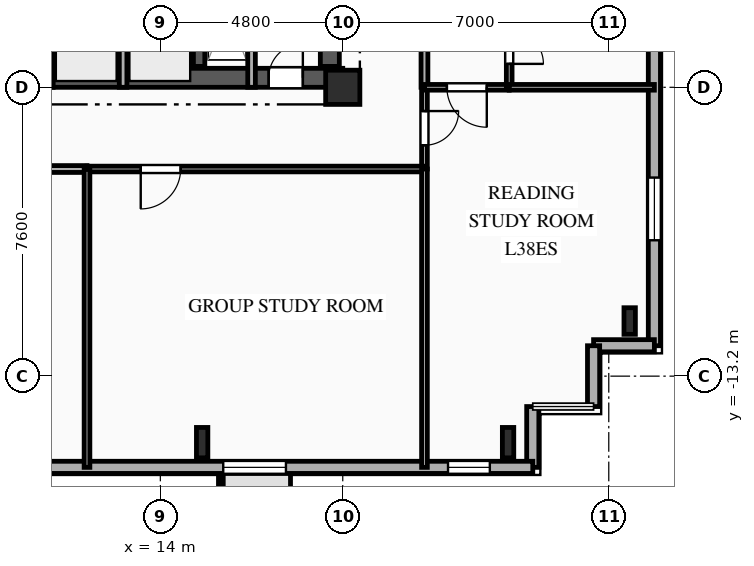
"""IFC4 building model, lengths in metres.
Left out: names, types, materials, properties, quantities, classifications, styles, units other than length and angle.
Written with IfcOpenShell. Run it as: python <this file> out.ifc"""

import sys

from ifc_helpers import new_model, si_unit, direction, frame, frame_2d, origin, origin_2d, place, context, subcontext, project, spatial, rectangle, i_section, extrude, element, fill, save


model = new_model("IFC4")
c1 = context("Model", 3, precision=1e-05, world=origin(), true_north=direction((0.0, 1.0)))
c2 = subcontext(c1, "Body", "Model", "MODEL_VIEW")
j1 = project(units=[si_unit("LENGTHUNIT", "METRE"), si_unit("PLANEANGLEUNIT", "RADIAN")], contexts=[c1])
p1 = place(None, origin())
s1 = spatial("IfcSite", under=j1, at=p1, CompositionType="ELEMENT")
p2 = place(p1, origin())
s2 = spatial("IfcBuilding", under=s1, at=p2, CompositionType="ELEMENT")
p3 = place(p2, frame((0.0, 0.0, 137.7)))
s3 = spatial("IfcBuildingStorey", under=s2, at=p3, CompositionType="ELEMENT", Elevation=137.7)
p4 = place(p3, frame((18.8, -5.6, 0.0), z_axis=(0.0, 0.0, 1.0), x_axis=(1.0, 0.0, 0.0)))
e1 = element("IfcColumn", 1, at=p4, inside=s3, PredefinedType="COLUMN", context=c2, shape_type="SweptSolid", body=[
    extrude(rectangle(XDim=0.9, YDim=0.9, at=origin_2d()), origin(), (0.0, 0.0, 1.0), 3.35),
])
for number, where, z_axis, x_axis in (
    (2, (15.1, -14.95, 0.0), (0.0, 0.0, 1.0), (1.0, 0.0, 0.0)),
    (3, (23.15, -14.95, 0.0), (0.0, 0.0, 1.0), (1.0, 0.0, 0.0)),
):
    element("IfcColumn", number, at=place(p3, frame(where, z_axis=z_axis, x_axis=x_axis)), inside=s3, PredefinedType="COLUMN", context=c2, shape_type="SweptSolid", body=[
        extrude(i_section(OverallWidth=0.3, OverallDepth=0.8, WebThickness=0.018, FlangeThickness=0.033, FilletRadius=0.03, at=origin_2d()), origin(), (0.0, 0.0, 1.0), 3.35),
    ])
p5 = place(p3, frame((26.35, -11.75, 0.0), z_axis=(0.0, 0.0, 1.0), x_axis=(1.0, 0.0, 0.0)))
e4 = element("IfcColumn", 4, at=p5, inside=s3, PredefinedType="COLUMN", context=c2, shape_type="SweptSolid", body=[
    extrude(i_section(OverallWidth=0.3, OverallDepth=0.7, WebThickness=0.017, FlangeThickness=0.032, FilletRadius=0.027, at=origin_2d()), origin(), (0.0, 0.0, 1.0), 3.35),
])
p6 = place(p3, frame((27.0, 17.2, 0.0), z_axis=(0.0, 0.0, 1.0), x_axis=(0.0, -1.0, 0.0)))
e5 = element("IfcWall", 5, at=p6, inside=s3, PredefinedType="SOLIDWALL", context=c2, shape_type="SweptSolid", body=[
    extrude(rectangle(XDim=29.6, YDim=0.32, at=frame_2d((14.8, 0.0))), origin(), (0.0, 0.0, 1.0), 3.04),
])
p7 = place(p6, frame((3.775, 0.0, 0.85)))
e6 = element("IfcOpeningElement", 6, at=p7, cuts=e5, PredefinedType="OPENING", context=c2, shape_type="SweptSolid", body=[
    extrude(rectangle(XDim=1.65, YDim=1.85, at=frame_2d((0.825, 0.925))), frame((0.0, 0.17, 0.0), z_axis=(0.0, -1.0, 0.0), x_axis=(1.0, 0.0, 0.0)), (0.0, 0.0, 1.0), 0.34),
])
p8 = place(p6, frame((9.37, 0.0, 0.85)))
e7 = element("IfcOpeningElement", 7, at=p8, cuts=e5, PredefinedType="OPENING", context=c2, shape_type="SweptSolid", body=[
    extrude(rectangle(XDim=1.5, YDim=1.85, at=frame_2d((0.75, 0.925))), frame((0.0, 0.17, 0.0), z_axis=(0.0, -1.0, 0.0), x_axis=(1.0, 0.0, 0.0)), (0.0, 0.0, 1.0), 0.34),
])
p9 = place(p6, frame((12.25, 0.0, 0.85)))
e8 = element("IfcOpeningElement", 8, at=p9, cuts=e5, PredefinedType="OPENING", context=c2, shape_type="SweptSolid", body=[
    extrude(rectangle(XDim=1.5, YDim=1.85, at=frame_2d((0.75, 0.925))), frame((0.0, 0.17, 0.0), z_axis=(0.0, -1.0, 0.0), x_axis=(1.0, 0.0, 0.0)), (0.0, 0.0, 1.0), 0.34),
])
p10 = place(p6, frame((15.05, 0.0, 0.85)))
e9 = element("IfcOpeningElement", 9, at=p10, cuts=e5, PredefinedType="OPENING", context=c2, shape_type="SweptSolid", body=[
    extrude(rectangle(XDim=1.5, YDim=1.85, at=frame_2d((0.75, 0.925))), frame((0.0, 0.17, 0.0), z_axis=(0.0, -1.0, 0.0), x_axis=(1.0, 0.0, 0.0)), (0.0, 0.0, 1.0), 0.34),
])
p11 = place(p6, frame((17.865, 0.0, 0.85)))
e10 = element("IfcOpeningElement", 10, at=p11, cuts=e5, PredefinedType="OPENING", context=c2, shape_type="SweptSolid", body=[
    extrude(rectangle(XDim=1.95, YDim=1.85, at=frame_2d((0.975, 0.925))), frame((0.0, 0.17, 0.0), z_axis=(0.0, -1.0, 0.0), x_axis=(1.0, 0.0, 0.0)), (0.0, 0.0, 1.0), 0.34),
])
p12 = place(p6, frame((25.175, 0.0, 0.85)))
e11 = element("IfcOpeningElement", 11, at=p12, cuts=e5, PredefinedType="OPENING", context=c2, shape_type="SweptSolid", body=[
    extrude(rectangle(XDim=1.65, YDim=1.85, at=frame_2d((0.825, 0.925))), frame((0.0, 0.17, 0.0), z_axis=(0.0, -1.0, 0.0), x_axis=(1.0, 0.0, 0.0)), (0.0, 0.0, 1.0), 0.34),
])
for number, where, z_axis, x_axis in (
    (12, (27.0, -12.4, 0.0), (0.0, 0.0, 1.0), (-1.0, 0.0, 0.0)),
    (13, (25.4, -12.4, 0.0), (0.0, 0.0, 1.0), (0.0, -1.0, 0.0)),
    (14, (23.8, -14.0, 0.0), (0.0, 0.0, 1.0), (0.0, -1.0, 0.0)),
):
    element("IfcWall", number, at=place(p3, frame(where, z_axis=z_axis, x_axis=x_axis)), inside=s3, PredefinedType="SOLIDWALL", context=c2, shape_type="SweptSolid", body=[
        extrude(rectangle(XDim=1.6, YDim=0.32, at=frame_2d((0.8, 0.0))), origin(), (0.0, 0.0, 1.0), 3.04),
    ])
p13 = place(p3, frame((23.8, -15.6, 0.0), z_axis=(0.0, 0.0, 1.0), x_axis=(-1.0, 0.0, 0.0)))
e15 = element("IfcWall", 15, at=p13, inside=s3, PredefinedType="SOLIDWALL", context=c2, shape_type="SweptSolid", body=[
    extrude(rectangle(XDim=49.6, YDim=0.32, at=frame_2d((24.8, 0.0))), origin(), (0.0, 0.0, 1.0), 3.04),
])
p14 = place(p13, frame((1.13, 0.0, 0.85)))
e16 = element("IfcOpeningElement", 16, at=p14, cuts=e15, PredefinedType="OPENING", context=c2, shape_type="SweptSolid", body=[
    extrude(rectangle(XDim=1.1, YDim=1.85, at=frame_2d((0.55, 0.925))), frame((0.0, 0.17, 0.0), z_axis=(0.0, -1.0, 0.0), x_axis=(1.0, 0.0, 0.0)), (0.0, 0.0, 1.0), 0.34),
])
p15 = place(p13, frame((6.495, 0.0, 0.85)))
e17 = element("IfcOpeningElement", 17, at=p15, cuts=e15, PredefinedType="OPENING", context=c2, shape_type="SweptSolid", body=[
    extrude(rectangle(XDim=1.65, YDim=1.85, at=frame_2d((0.825, 0.925))), frame((0.0, 0.17, 0.0), z_axis=(0.0, -1.0, 0.0), x_axis=(1.0, 0.0, 0.0)), (0.0, 0.0, 1.0), 0.34),
])
p16 = place(p13, frame((13.996, 0.0, 0.85)))
e18 = element("IfcOpeningElement", 18, at=p16, cuts=e15, PredefinedType="OPENING", context=c2, shape_type="SweptSolid", body=[
    extrude(rectangle(XDim=2.2, YDim=1.85, at=frame_2d((1.1, 0.925))), frame((0.0, 0.17, 0.0), z_axis=(0.0, -1.0, 0.0), x_axis=(1.0, 0.0, 0.0)), (0.0, 0.0, 1.0), 0.34),
])
p17 = place(p13, frame((22.396, 0.0, 0.85)))
e19 = element("IfcOpeningElement", 19, at=p17, cuts=e15, PredefinedType="OPENING", context=c2, shape_type="SweptSolid", body=[
    extrude(rectangle(XDim=2.2, YDim=1.85, at=frame_2d((1.1, 0.925))), frame((0.0, 0.17, 0.0), z_axis=(0.0, -1.0, 0.0), x_axis=(1.0, 0.0, 0.0)), (0.0, 0.0, 1.0), 0.34),
])
p18 = place(p13, frame((30.2, 0.0, 0.85)))
e20 = element("IfcOpeningElement", 20, at=p18, cuts=e15, PredefinedType="OPENING", context=c2, shape_type="SweptSolid", body=[
    extrude(rectangle(XDim=2.2, YDim=1.85, at=frame_2d((1.1, 0.925))), frame((0.0, 0.17, 0.0), z_axis=(0.0, -1.0, 0.0), x_axis=(1.0, 0.0, 0.0)), (0.0, 0.0, 1.0), 0.34),
])
p19 = place(p13, frame((38.673, 0.0, 0.85)))
e21 = element("IfcOpeningElement", 21, at=p19, cuts=e15, PredefinedType="OPENING", context=c2, shape_type="SweptSolid", body=[
    extrude(rectangle(XDim=1.65, YDim=1.85, at=frame_2d((0.825, 0.925))), frame((0.0, 0.17, 0.0), z_axis=(0.0, -1.0, 0.0), x_axis=(1.0, 0.0, 0.0)), (0.0, 0.0, 1.0), 0.34),
])
p20 = place(p13, frame((46.175, 0.0, 0.85)))
e22 = element("IfcOpeningElement", 22, at=p20, cuts=e15, PredefinedType="OPENING", context=c2, shape_type="SweptSolid", body=[
    extrude(rectangle(XDim=1.65, YDim=1.85, at=frame_2d((0.825, 0.925))), frame((0.0, 0.17, 0.0), z_axis=(0.0, -1.0, 0.0), x_axis=(1.0, 0.0, 0.0)), (0.0, 0.0, 1.0), 0.34),
])
p21 = place(p3, frame((9.2, -5.35, 0.0), z_axis=(0.0, 0.0, 1.0), x_axis=(1.0, 0.0, 0.0)))
e23 = element("IfcWall", 23, at=p21, inside=s3, PredefinedType="SHEAR", context=c2, shape_type="SweptSolid", body=[
    extrude(rectangle(XDim=9.6, YDim=0.5, at=frame_2d((4.8, 0.0))), origin(), (0.0, 0.0, 1.0), 3.04),
])
p22 = place(p21, frame((7.65, 0.0, 0.0)))
e24 = element("IfcOpeningElement", 24, at=p22, cuts=e23, PredefinedType="OPENING", context=c2, shape_type="SweptSolid", body=[
    extrude(rectangle(XDim=0.9, YDim=2.1, at=frame_2d((0.45, 1.05))), frame((0.0, 0.26, 0.0), z_axis=(0.0, -1.0, 0.0), x_axis=(1.0, 0.0, 0.0)), (0.0, 0.0, 1.0), 0.52),
])
p23 = place(p3, frame((18.46, -5.05, 0.0), z_axis=(0.0, 0.0, 1.0), x_axis=(0.0, 1.0, 0.0)))
e25 = element("IfcWall", 25, at=p23, inside=s3, PredefinedType="SHEAR", context=c2, shape_type="SweptSolid", body=[
    extrude(rectangle(XDim=10.1, YDim=0.5, at=frame_2d((5.05, 0.0))), origin(), (0.0, 0.0, 1.0), 3.04),
])
p24 = place(p3, frame((15.02, -5.05, 0.0), z_axis=(0.0, 0.0, 1.0), x_axis=(0.0, 1.0, 0.0)))
e26 = element("IfcWall", 26, at=p24, inside=s3, PredefinedType="SHEAR", context=c2, shape_type="SweptSolid", body=[
    extrude(rectangle(XDim=10.1, YDim=0.3, at=frame_2d((5.05, 0.0))), origin(), (0.0, 0.0, 1.0), 3.04),
])
p25 = place(p3, frame((16.4, -2.11, 0.0), z_axis=(0.0, 0.0, 1.0), x_axis=(0.0, -1.0, 0.0)))
e27 = element("IfcWall", 27, at=p25, inside=s3, PredefinedType="PARTITIONING", context=c2, shape_type="SweptSolid", body=[
    extrude(rectangle(XDim=3.49, YDim=0.2, at=frame_2d((1.745, 0.0))), origin(), (0.0, 0.0, 1.0), 3.04),
])
for number, where, z_axis, x_axis in (
    (28, (11.08, -5.6, 0.0), (0.0, 0.0, 1.0), (0.0, 1.0, 0.0)),
    (29, (13.02, -5.6, 0.0), (0.0, 0.0, 1.0), (0.0, 1.0, 0.0)),
):
    element("IfcWall", number, at=place(p3, frame(where, z_axis=z_axis, x_axis=x_axis)), inside=s3, PredefinedType="PARTITIONING", context=c2, shape_type="SweptSolid", body=[
        extrude(rectangle(XDim=2.25, YDim=0.2, at=frame_2d((1.125, 0.0))), origin(), (0.0, 0.0, 1.0), 3.04),
    ])
p26 = place(p3, frame((20.95, -5.6, 0.0), z_axis=(0.0, 0.0, 1.0), x_axis=(0.0, -1.0, 0.0)))
e30 = element("IfcWall", 30, at=p26, inside=s3, PredefinedType="PARTITIONING", context=c2, shape_type="SweptSolid", body=[
    extrude(rectangle(XDim=2.15, YDim=0.15, at=frame_2d((1.075, 0.0))), origin(), (0.0, 0.0, 1.0), 3.04),
])
p27 = place(p26, frame((0.625, 0.0, 0.0)))
e31 = element("IfcOpeningElement", 31, at=p27, cuts=e30, PredefinedType="OPENING", context=c2, shape_type="SweptSolid", body=[
    extrude(rectangle(XDim=0.9, YDim=2.1, at=frame_2d((0.45, 1.05))), frame((0.0, 0.085, 0.0), z_axis=(0.0, -1.0, 0.0), x_axis=(1.0, 0.0, 0.0)), (0.0, 0.0, 1.0), 0.17),
])
p28 = place(p3, frame((12.07, -7.75, 0.0), z_axis=(0.0, 0.0, 1.0), x_axis=(-1.0, 0.0, 0.0)))
e32 = element("IfcWall", 32, at=p28, inside=s3, PredefinedType="PARTITIONING", context=c2, shape_type="SweptSolid", body=[
    extrude(rectangle(XDim=5.93, YDim=0.18, at=frame_2d((2.965, 0.0))), origin(), (0.0, 0.0, 1.0), 3.04),
])
p29 = place(p28, frame((3.879, 0.0, 0.0)))
e33 = element("IfcOpeningElement", 33, at=p29, cuts=e32, PredefinedType="OPENING", context=c2, shape_type="SweptSolid", body=[
    extrude(rectangle(XDim=1.0, YDim=2.15, at=frame_2d((0.5, 1.075))), frame((0.0, 0.1, 0.0), z_axis=(0.0, -1.0, 0.0), x_axis=(1.0, 0.0, 0.0)), (0.0, 0.0, 1.0), 0.2),
])
p30 = place(p3, frame((20.95, -7.75, 0.0), z_axis=(0.0, 0.0, 1.0), x_axis=(-1.0, 0.0, 0.0)))
e34 = element("IfcWall", 34, at=p30, inside=s3, PredefinedType="PARTITIONING", context=c2, shape_type="SweptSolid", body=[
    extrude(rectangle(XDim=8.88, YDim=0.15, at=frame_2d((4.44, 0.0))), origin(), (0.0, 0.0, 1.0), 3.04),
])
p31 = place(p30, frame((6.416, 0.0, 0.0)))
e35 = element("IfcOpeningElement", 35, at=p31, cuts=e34, PredefinedType="OPENING", context=c2, shape_type="SweptSolid", body=[
    extrude(rectangle(XDim=1.05, YDim=2.15, at=frame_2d((0.525, 1.075))), frame((0.0, 0.085, 0.0), z_axis=(0.0, -1.0, 0.0), x_axis=(1.0, 0.0, 0.0)), (0.0, 0.0, 1.0), 0.17),
])
p32 = place(p3, frame((20.95, 8.5, 0.0), z_axis=(0.0, 0.0, 1.0), x_axis=(0.0, -1.0, 0.0)))
e36 = element("IfcWall", 36, at=p32, inside=s3, PredefinedType="PARTITIONING", context=c2, shape_type="SweptSolid", body=[
    extrude(rectangle(XDim=14.1, YDim=0.18, at=frame_2d((7.05, 0.0))), origin(), (0.0, 0.0, 1.0), 3.04),
])
p33 = place(p32, frame((8.042, 0.0, 0.0)))
e37 = element("IfcOpeningElement", 37, at=p33, cuts=e36, PredefinedType="OPENING", context=c2, shape_type="SweptSolid", body=[
    extrude(rectangle(XDim=1.0, YDim=2.15, at=frame_2d((0.5, 1.075))), frame((0.0, 0.1, 0.0), z_axis=(0.0, -1.0, 0.0), x_axis=(1.0, 0.0, 0.0)), (0.0, 0.0, 1.0), 0.2),
])
p34 = place(p3, frame((23.18, -5.6, 0.0), z_axis=(0.0, 0.0, 1.0), x_axis=(-1.0, 0.0, 0.0)))
e38 = element("IfcWall", 38, at=p34, inside=s3, PredefinedType="PARTITIONING", context=c2, shape_type="SweptSolid", body=[
    extrude(rectangle(XDim=2.23, YDim=0.15, at=frame_2d((1.115, 0.0))), origin(), (0.0, 0.0, 1.0), 3.04),
])
p35 = place(p34, frame((0.59, 0.0, 0.0)))
e39 = element("IfcOpeningElement", 39, at=p35, cuts=e38, PredefinedType="OPENING", context=c2, shape_type="SweptSolid", body=[
    extrude(rectangle(XDim=1.05, YDim=2.15, at=frame_2d((0.525, 1.075))), frame((0.0, 0.085, 0.0), z_axis=(0.0, -1.0, 0.0), x_axis=(1.0, 0.0, 0.0)), (0.0, 0.0, 1.0), 0.17),
])
p36 = place(p3, frame((23.18, -3.25, 0.0), z_axis=(0.0, 0.0, 1.0), x_axis=(0.0, -1.0, 0.0)))
e40 = element("IfcWall", 40, at=p36, inside=s3, PredefinedType="PLUMBINGWALL", context=c2, shape_type="SweptSolid", body=[
    extrude(rectangle(XDim=2.35, YDim=0.15, at=frame_2d((1.175, 0.0))), origin(), (0.0, 0.0, 1.0), 3.04),
])
p37 = place(p36, frame((0.834, 0.0, 0.0)))
e41 = element("IfcOpeningElement", 41, at=p37, cuts=e40, PredefinedType="OPENING", context=c2, shape_type="SweptSolid", body=[
    extrude(rectangle(XDim=0.9, YDim=2.1, at=frame_2d((0.45, 1.05))), frame((0.0, 0.085, 0.0), z_axis=(0.0, -1.0, 0.0), x_axis=(1.0, 0.0, 0.0)), (0.0, 0.0, 1.0), 0.17),
])
p38 = place(p3, frame((23.18, -5.6, 0.0), z_axis=(0.0, 0.0, 1.0), x_axis=(1.0, 0.0, 0.0)))
e42 = element("IfcWall", 42, at=p38, inside=s3, PredefinedType="PLUMBINGWALL", context=c2, shape_type="SweptSolid", body=[
    extrude(rectangle(XDim=3.82, YDim=0.15, at=frame_2d((1.91, 0.0))), origin(), (0.0, 0.0, 1.0), 3.04),
])
for number, where, z_axis, x_axis in (
    (43, (20.95, -15.6, 0.0), (0.0, 0.0, 1.0), (0.0, 1.0, 0.0)),
    (44, (12.07, -7.75, 0.0), (0.0, 0.0, 1.0), (0.0, -1.0, 0.0)),
):
    element("IfcWall", number, at=place(p3, frame(where, z_axis=z_axis, x_axis=x_axis)), inside=s3, PredefinedType="PARTITIONING", context=c2, shape_type="SweptSolid", body=[
        extrude(rectangle(XDim=7.85, YDim=0.15, at=frame_2d((3.925, 0.0))), origin(), (0.0, 0.0, 1.0), 3.04),
    ])
p39 = place(p12, origin())
e45 = element("IfcWindow", 45, at=p39, inside=s3, PartitioningType="SINGLE_PANEL", PredefinedType="WINDOW", context=c2, shape_type="SweptSolid", body=[
    extrude(rectangle(XDim=1.65, YDim=1.85, at=frame_2d((0.825, 0.925))), frame((0.0, 0.03, 0.0), z_axis=(0.0, -1.0, 0.0), x_axis=(1.0, 0.0, 0.0)), (0.0, 0.0, 1.0), 0.06),
])
fill(e11, e45)
p40 = place(p14, origin())
e46 = element("IfcWindow", 46, at=p40, inside=s3, PartitioningType="SINGLE_PANEL", PredefinedType="WINDOW", context=c2, shape_type="SweptSolid", body=[
    extrude(rectangle(XDim=1.1, YDim=1.85, at=frame_2d((0.55, 0.925))), frame((0.0, 0.03, 0.0), z_axis=(0.0, -1.0, 0.0), x_axis=(1.0, 0.0, 0.0)), (0.0, 0.0, 1.0), 0.06),
])
fill(e16, e46)
p41 = place(p15, origin())
e47 = element("IfcWindow", 47, at=p41, inside=s3, PartitioningType="SINGLE_PANEL", PredefinedType="WINDOW", context=c2, shape_type="SweptSolid", body=[
    extrude(rectangle(XDim=1.65, YDim=1.85, at=frame_2d((0.825, 0.925))), frame((0.0, 0.03, 0.0), z_axis=(0.0, -1.0, 0.0), x_axis=(1.0, 0.0, 0.0)), (0.0, 0.0, 1.0), 0.06),
])
fill(e17, e47)
p42 = place(p22, origin())
e48 = element("IfcDoor", 48, at=p42, inside=s3, OperationType="SINGLE_SWING_RIGHT", PredefinedType="DOOR", context=c2, shape_type="SweptSolid", body=[
    extrude(rectangle(XDim=0.9, YDim=2.1, at=frame_2d((0.45, 1.05))), frame((0.0, 0.025, 0.0), z_axis=(0.0, -1.0, 0.0), x_axis=(1.0, 0.0, 0.0)), (0.0, 0.0, 1.0), 0.05),
])
fill(e24, e48)
p43 = place(p27, origin())
e49 = element("IfcDoor", 49, at=p43, inside=s3, OperationType="SINGLE_SWING_LEFT", PredefinedType="DOOR", context=c2, shape_type="SweptSolid", body=[
    extrude(rectangle(XDim=0.9, YDim=2.1, at=frame_2d((0.45, 1.05))), frame((0.0, 0.025, 0.0), z_axis=(0.0, -1.0, 0.0), x_axis=(1.0, 0.0, 0.0)), (0.0, 0.0, 1.0), 0.05),
])
fill(e31, e49)
p44 = place(p31, origin())
e50 = element("IfcDoor", 50, at=p44, inside=s3, OperationType="SINGLE_SWING_RIGHT", PredefinedType="DOOR", context=c2, shape_type="SweptSolid", body=[
    extrude(rectangle(XDim=1.05, YDim=2.15, at=frame_2d((0.525, 1.075))), frame((0.0, 0.025, 0.0), z_axis=(0.0, -1.0, 0.0), x_axis=(1.0, 0.0, 0.0)), (0.0, 0.0, 1.0), 0.05),
])
fill(e35, e50)
p45 = place(p35, origin())
e51 = element("IfcDoor", 51, at=p45, inside=s3, OperationType="SINGLE_SWING_LEFT", PredefinedType="DOOR", context=c2, shape_type="SweptSolid", body=[
    extrude(rectangle(XDim=1.05, YDim=2.15, at=frame_2d((0.525, 1.075))), frame((0.0, 0.025, 0.0), z_axis=(0.0, -1.0, 0.0), x_axis=(1.0, 0.0, 0.0)), (0.0, 0.0, 1.0), 0.05),
])
fill(e39, e51)
p46 = place(p37, origin())
e52 = element("IfcDoor", 52, at=p46, inside=s3, OperationType="SINGLE_SWING_RIGHT", PredefinedType="DOOR", context=c2, shape_type="SweptSolid", body=[
    extrude(rectangle(XDim=0.9, YDim=2.1, at=frame_2d((0.45, 1.05))), frame((0.0, 0.025, 0.0), z_axis=(0.0, -1.0, 0.0), x_axis=(1.0, 0.0, 0.0)), (0.0, 0.0, 1.0), 0.05),
])
fill(e41, e52)
save(model, sys.argv[1])
